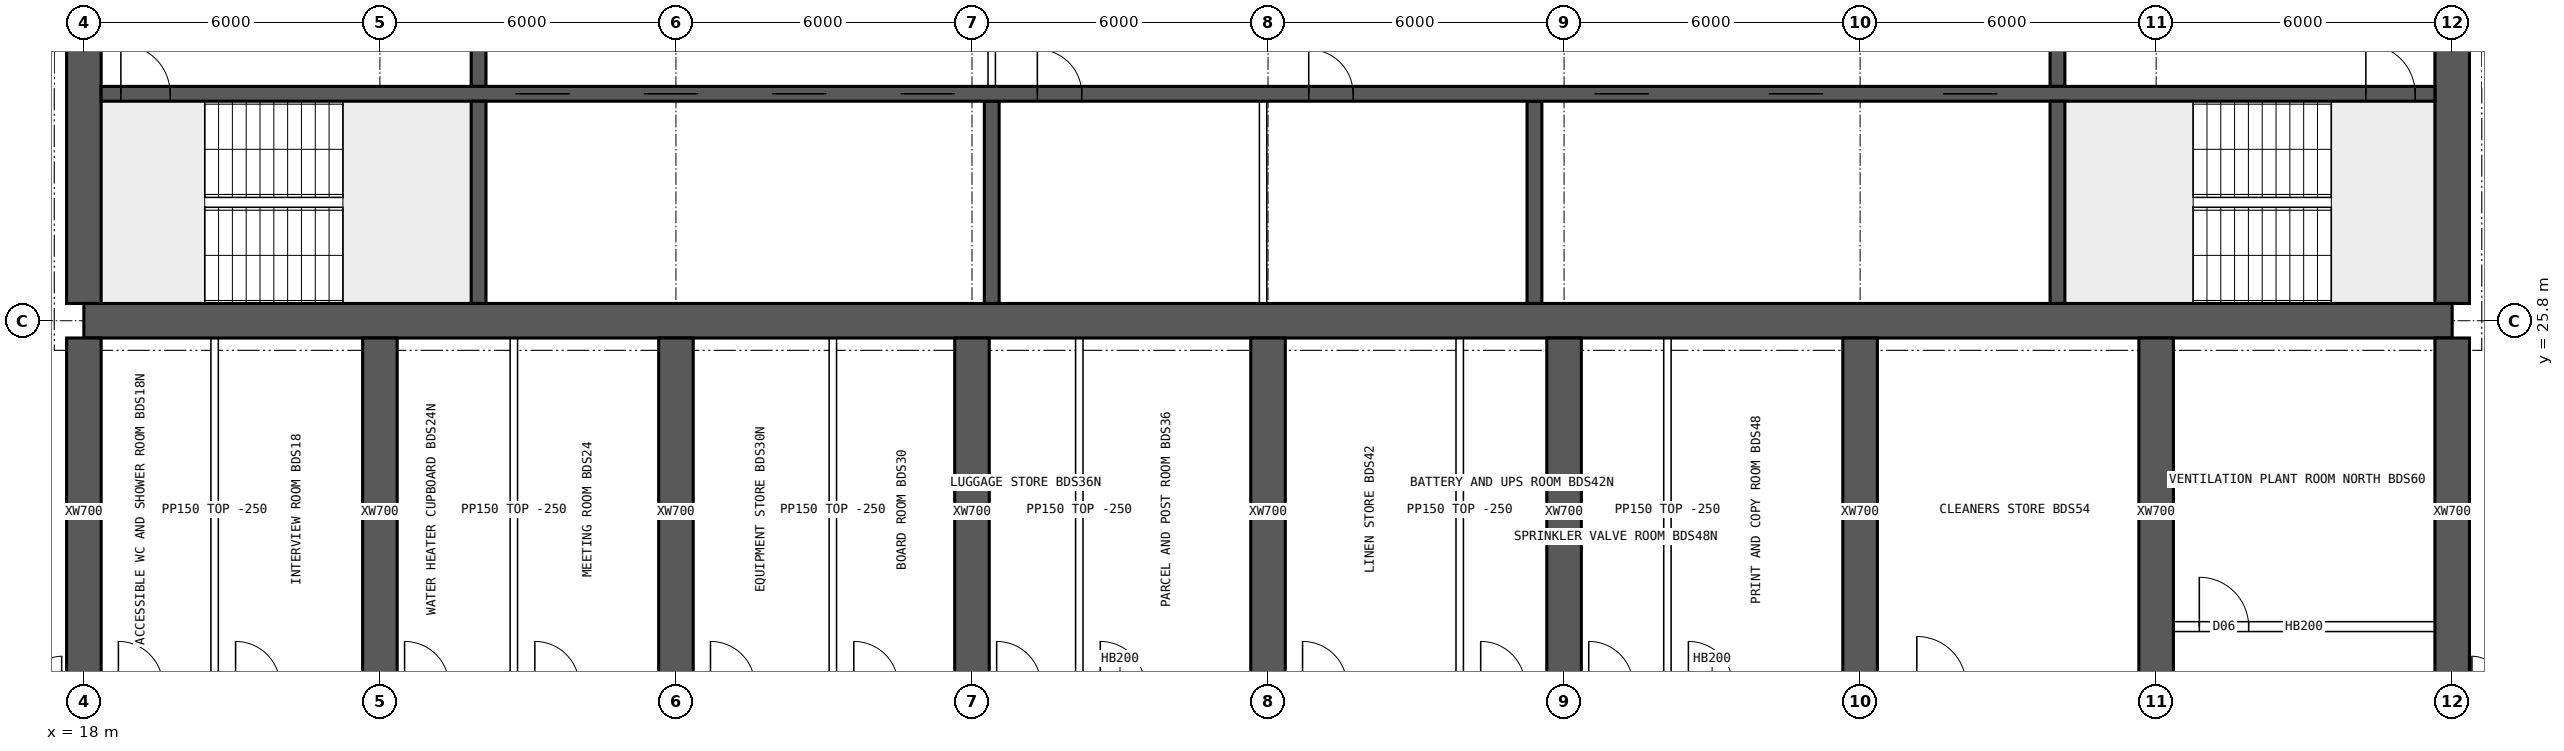
"""IFC4 building model, lengths in metres.
Left out: names, types, materials, properties, quantities, classifications, styles, units other than length and angle.
Written with IfcOpenShell. Run it as: python <this file> out.ifc"""

import sys

from ifc_helpers import new_model, si_unit, direction, frame, frame_2d, origin, place, context, subcontext, project, spatial, rectangle, extrude, element, fill, save


model = new_model("IFC4")
c1 = context("Model", 3, precision=1e-05, world=origin(), true_north=direction((0.0, 1.0)))
c2 = subcontext(c1, "Body", "Model", "MODEL_VIEW")
j1 = project(units=[si_unit("LENGTHUNIT", "METRE"), si_unit("PLANEANGLEUNIT", "RADIAN")], contexts=[c1])
p1 = place(None, origin())
s1 = spatial("IfcSite", under=j1, at=p1, CompositionType="ELEMENT")
p2 = place(p1, origin())
s2 = spatial("IfcBuilding", under=s1, at=p2, CompositionType="ELEMENT")
p3 = place(p2, frame((0.0, 0.0, 235.3)))
s3 = spatial("IfcBuildingStorey", under=s2, at=p3, CompositionType="ELEMENT", Elevation=235.3)
p4 = place(p3, frame((18.0, 25.8, 0.0), z_axis=(0.0, 0.0, 1.0), x_axis=(1.0, 0.0, 0.0)))
e1 = element("IfcWall", 1, at=p4, inside=s3, PredefinedType="SHEAR", context=c2, shape_type="SweptSolid", body=[
    extrude(rectangle(XDim=48.0, YDim=0.7, at=frame_2d((24.0, 0.0))), origin(), (0.0, 0.0, 1.0), 3.75),
])
p5 = place(p3, frame((18.0, 26.15, 0.0), z_axis=(0.0, 0.0, 1.0), x_axis=(0.0, 1.0, 0.0)))
e2 = element("IfcWall", 2, at=p5, inside=s3, PredefinedType="SHEAR", context=c2, shape_type="SweptSolid", body=[
    extrude(rectangle(XDim=11.7, YDim=0.7, at=frame_2d((5.85, 0.0))), origin(), (0.0, 0.0, 1.0), 3.75),
])
p6 = place(p5, frame((5.15, 0.0, 0.0)))
e3 = element("IfcOpeningElement", 3, at=p6, cuts=e2, PredefinedType="OPENING", context=c2, shape_type="SweptSolid", body=[
    extrude(rectangle(XDim=1.2, YDim=2.1, at=frame_2d((0.6, 1.05))), frame((0.0, 0.36, 0.0), z_axis=(0.0, -1.0, 0.0), x_axis=(1.0, 0.0, 0.0)), (0.0, 0.0, 1.0), 0.72),
])
p7 = place(p3, frame((66.0, 26.15, 0.0), z_axis=(0.0, 0.0, 1.0), x_axis=(0.0, 1.0, 0.0)))
e4 = element("IfcWall", 4, at=p7, inside=s3, PredefinedType="SHEAR", context=c2, shape_type="SweptSolid", body=[
    extrude(rectangle(XDim=11.7, YDim=0.7, at=frame_2d((5.85, 0.0))), origin(), (0.0, 0.0, 1.0), 3.75),
])
p8 = place(p7, frame((5.15, 0.0, 0.0)))
e5 = element("IfcOpeningElement", 5, at=p8, cuts=e4, PredefinedType="OPENING", context=c2, shape_type="SweptSolid", body=[
    extrude(rectangle(XDim=1.2, YDim=2.1, at=frame_2d((0.6, 1.05))), frame((0.0, 0.36, 0.0), z_axis=(0.0, -1.0, 0.0), x_axis=(1.0, 0.0, 0.0)), (0.0, 0.0, 1.0), 0.72),
])
p9 = place(p3, frame((18.35, 30.4, 0.0), z_axis=(0.0, 0.0, 1.0), x_axis=(1.0, 0.0, 0.0)))
e6 = element("IfcWall", 6, at=p9, inside=s3, PredefinedType="SHEAR", context=c2, shape_type="SweptSolid", body=[
    extrude(rectangle(XDim=47.3, YDim=0.3, at=frame_2d((23.65, 0.0))), origin(), (0.0, 0.0, 1.0), 3.75),
])
p10 = place(p9, frame((0.4, 0.0, 0.0)))
e7 = element("IfcOpeningElement", 7, at=p10, cuts=e6, PredefinedType="OPENING", context=c2, shape_type="SweptSolid", body=[
    extrude(rectangle(XDim=1.0, YDim=2.1, at=frame_2d((0.5, 1.05))), frame((0.0, 0.16, 0.0), z_axis=(0.0, -1.0, 0.0), x_axis=(1.0, 0.0, 0.0)), (0.0, 0.0, 1.0), 0.32),
])
p11 = place(p9, frame((45.9, 0.0, 0.0)))
e8 = element("IfcOpeningElement", 8, at=p11, cuts=e6, PredefinedType="OPENING", context=c2, shape_type="SweptSolid", body=[
    extrude(rectangle(XDim=1.0, YDim=2.1, at=frame_2d((0.5, 1.05))), frame((0.0, 0.16, 0.0), z_axis=(0.0, -1.0, 0.0), x_axis=(1.0, 0.0, 0.0)), (0.0, 0.0, 1.0), 0.32),
])
p12 = place(p9, frame((8.4, 0.0, 0.0)))
e9 = element("IfcOpeningElement", 9, at=p12, cuts=e6, PredefinedType="OPENING", context=c2, shape_type="SweptSolid", body=[
    extrude(rectangle(XDim=1.1, YDim=2.1, at=frame_2d((0.55, 1.05))), frame((0.0, 0.16, 0.0), z_axis=(0.0, -1.0, 0.0), x_axis=(1.0, 0.0, 0.0)), (0.0, 0.0, 1.0), 0.32),
])
p13 = place(p9, frame((11.0, 0.0, 0.0)))
e10 = element("IfcOpeningElement", 10, at=p13, cuts=e6, PredefinedType="OPENING", context=c2, shape_type="SweptSolid", body=[
    extrude(rectangle(XDim=1.1, YDim=2.1, at=frame_2d((0.55, 1.05))), frame((0.0, 0.16, 0.0), z_axis=(0.0, -1.0, 0.0), x_axis=(1.0, 0.0, 0.0)), (0.0, 0.0, 1.0), 0.32),
])
p14 = place(p9, frame((13.6, 0.0, 0.0)))
e11 = element("IfcOpeningElement", 11, at=p14, cuts=e6, PredefinedType="OPENING", context=c2, shape_type="SweptSolid", body=[
    extrude(rectangle(XDim=1.1, YDim=2.1, at=frame_2d((0.55, 1.05))), frame((0.0, 0.16, 0.0), z_axis=(0.0, -1.0, 0.0), x_axis=(1.0, 0.0, 0.0)), (0.0, 0.0, 1.0), 0.32),
])
p15 = place(p9, frame((16.2, 0.0, 0.0)))
e12 = element("IfcOpeningElement", 12, at=p15, cuts=e6, PredefinedType="OPENING", context=c2, shape_type="SweptSolid", body=[
    extrude(rectangle(XDim=1.1, YDim=2.1, at=frame_2d((0.55, 1.05))), frame((0.0, 0.16, 0.0), z_axis=(0.0, -1.0, 0.0), x_axis=(1.0, 0.0, 0.0)), (0.0, 0.0, 1.0), 0.32),
])
p16 = place(p9, frame((18.975, 0.0, 0.0)))
e13 = element("IfcOpeningElement", 13, at=p16, cuts=e6, PredefinedType="OPENING", context=c2, shape_type="SweptSolid", body=[
    extrude(rectangle(XDim=0.9, YDim=2.1, at=frame_2d((0.45, 1.05))), frame((0.0, 0.16, 0.0), z_axis=(0.0, -1.0, 0.0), x_axis=(1.0, 0.0, 0.0)), (0.0, 0.0, 1.0), 0.32),
])
p17 = place(p9, frame((24.475, 0.0, 0.0)))
e14 = element("IfcOpeningElement", 14, at=p17, cuts=e6, PredefinedType="OPENING", context=c2, shape_type="SweptSolid", body=[
    extrude(rectangle(XDim=0.9, YDim=2.1, at=frame_2d((0.45, 1.05))), frame((0.0, 0.16, 0.0), z_axis=(0.0, -1.0, 0.0), x_axis=(1.0, 0.0, 0.0)), (0.0, 0.0, 1.0), 0.32),
])
p18 = place(p9, frame((30.267, 0.0, 0.0)))
e15 = element("IfcOpeningElement", 15, at=p18, cuts=e6, PredefinedType="OPENING", context=c2, shape_type="SweptSolid", body=[
    extrude(rectangle(XDim=1.1, YDim=2.1, at=frame_2d((0.55, 1.05))), frame((0.0, 0.16, 0.0), z_axis=(0.0, -1.0, 0.0), x_axis=(1.0, 0.0, 0.0)), (0.0, 0.0, 1.0), 0.32),
])
p19 = place(p9, frame((33.8, 0.0, 0.0)))
e16 = element("IfcOpeningElement", 16, at=p19, cuts=e6, PredefinedType="OPENING", context=c2, shape_type="SweptSolid", body=[
    extrude(rectangle(XDim=1.1, YDim=2.1, at=frame_2d((0.55, 1.05))), frame((0.0, 0.16, 0.0), z_axis=(0.0, -1.0, 0.0), x_axis=(1.0, 0.0, 0.0)), (0.0, 0.0, 1.0), 0.32),
])
p20 = place(p9, frame((37.333, 0.0, 0.0)))
e17 = element("IfcOpeningElement", 17, at=p20, cuts=e6, PredefinedType="OPENING", context=c2, shape_type="SweptSolid", body=[
    extrude(rectangle(XDim=1.1, YDim=2.1, at=frame_2d((0.55, 1.05))), frame((0.0, 0.16, 0.0), z_axis=(0.0, -1.0, 0.0), x_axis=(1.0, 0.0, 0.0)), (0.0, 0.0, 1.0), 0.32),
])
for number, where, z_axis, x_axis in (
    (18, (26.0, 26.15, 0.0), (0.0, 0.0, 1.0), (0.0, 1.0, 0.0)),
    (19, (58.0, 26.15, 0.0), (0.0, 0.0, 1.0), (0.0, 1.0, 0.0)),
):
    element("IfcWall", number, at=place(p3, frame(where, z_axis=z_axis, x_axis=x_axis)), inside=s3, PredefinedType="SHEAR", context=c2, shape_type="SweptSolid", body=[
        extrude(rectangle(XDim=4.1, YDim=0.3, at=frame_2d((2.05, 0.0))), origin(), (0.0, 0.0, 1.0), 3.75),
    ])
p21 = place(p3, frame((26.0, 30.55, 0.0), z_axis=(0.0, 0.0, 1.0), x_axis=(0.0, 1.0, 0.0)))
e20 = element("IfcWall", 20, at=p21, inside=s3, PredefinedType="SHEAR", context=c2, shape_type="SweptSolid", body=[
    extrude(rectangle(XDim=3.9, YDim=0.3, at=frame_2d((1.95, 0.0))), origin(), (0.0, 0.0, 1.0), 3.75),
])
p22 = place(p21, frame((1.4, 0.0, 0.0)))
e21 = element("IfcOpeningElement", 21, at=p22, cuts=e20, PredefinedType="OPENING", context=c2, shape_type="SweptSolid", body=[
    extrude(rectangle(XDim=1.2, YDim=2.1, at=frame_2d((0.6, 1.05))), frame((0.0, 0.16, 0.0), z_axis=(0.0, -1.0, 0.0), x_axis=(1.0, 0.0, 0.0)), (0.0, 0.0, 1.0), 0.32),
])
p23 = place(p3, frame((58.0, 30.55, 0.0), z_axis=(0.0, 0.0, 1.0), x_axis=(0.0, 1.0, 0.0)))
e22 = element("IfcWall", 22, at=p23, inside=s3, PredefinedType="SHEAR", context=c2, shape_type="SweptSolid", body=[
    extrude(rectangle(XDim=3.9, YDim=0.3, at=frame_2d((1.95, 0.0))), origin(), (0.0, 0.0, 1.0), 3.75),
])
p24 = place(p23, frame((1.4, 0.0, 0.0)))
e23 = element("IfcOpeningElement", 23, at=p24, cuts=e22, PredefinedType="OPENING", context=c2, shape_type="SweptSolid", body=[
    extrude(rectangle(XDim=1.2, YDim=2.1, at=frame_2d((0.6, 1.05))), frame((0.0, 0.16, 0.0), z_axis=(0.0, -1.0, 0.0), x_axis=(1.0, 0.0, 0.0)), (0.0, 0.0, 1.0), 0.32),
])
for number, where, z_axis, x_axis in (
    (24, (36.4, 26.15, 0.0), (0.0, 0.0, 1.0), (0.0, 1.0, 0.0)),
    (25, (47.4, 26.15, 0.0), (0.0, 0.0, 1.0), (0.0, 1.0, 0.0)),
):
    element("IfcWall", number, at=place(p3, frame(where, z_axis=z_axis, x_axis=x_axis)), inside=s3, PredefinedType="SHEAR", context=c2, shape_type="SweptSolid", body=[
        extrude(rectangle(XDim=4.1, YDim=0.3, at=frame_2d((2.05, 0.0))), origin(), (0.0, 0.0, 1.0), 3.75),
    ])
for number, where, z_axis, x_axis in (
    (26, (18.0, 18.4, 0.0), (0.0, 0.0, 1.0), (0.0, 1.0, 0.0)),
    (27, (24.0, 18.4, 0.0), (0.0, 0.0, 1.0), (0.0, 1.0, 0.0)),
    (28, (30.0, 18.4, 0.0), (0.0, 0.0, 1.0), (0.0, 1.0, 0.0)),
    (29, (36.0, 18.4, 0.0), (0.0, 0.0, 1.0), (0.0, 1.0, 0.0)),
    (30, (42.0, 18.4, 0.0), (0.0, 0.0, 1.0), (0.0, 1.0, 0.0)),
    (31, (48.0, 18.4, 0.0), (0.0, 0.0, 1.0), (0.0, 1.0, 0.0)),
    (32, (54.0, 18.4, 0.0), (0.0, 0.0, 1.0), (0.0, 1.0, 0.0)),
    (33, (60.0, 18.4, 0.0), (0.0, 0.0, 1.0), (0.0, 1.0, 0.0)),
    (34, (66.0, 18.4, 0.0), (0.0, 0.0, 1.0), (0.0, 1.0, 0.0)),
):
    element("IfcWall", number, at=place(p3, frame(where, z_axis=z_axis, x_axis=x_axis)), inside=s3, PredefinedType="SHEAR", context=c2, shape_type="SweptSolid", body=[
        extrude(rectangle(XDim=7.05, YDim=0.7, at=frame_2d((3.525, 0.0))), origin(), (0.0, 0.0, 1.0), 3.75),
    ])
p25 = place(p3, frame((36.4, 30.55, 0.0), z_axis=(0.0, 0.0, 1.0), x_axis=(0.0, 1.0, 0.0)))
e35 = element("IfcWall", 35, at=p25, inside=s3, PredefinedType="SOLIDWALL", context=c2, shape_type="SweptSolid", body=[
    extrude(rectangle(XDim=3.9, YDim=0.15, at=frame_2d((1.95, 0.0))), origin(), (0.0, 0.0, 1.0), 3.5),
])
p26 = place(p25, frame((1.15, 0.0, 0.0)))
e36 = element("IfcOpeningElement", 36, at=p26, cuts=e35, PredefinedType="OPENING", context=c2, shape_type="SweptSolid", body=[
    extrude(rectangle(XDim=1.6, YDim=2.1, at=frame_2d((0.8, 1.05))), frame((0.0, 0.085, 0.0), z_axis=(0.0, -1.0, 0.0), x_axis=(1.0, 0.0, 0.0)), (0.0, 0.0, 1.0), 0.17),
])
p27 = place(p3, frame((41.9, 26.15, 0.0), z_axis=(0.0, 0.0, 1.0), x_axis=(0.0, 1.0, 0.0)))
e37 = element("IfcWall", 37, at=p27, inside=s3, PredefinedType="SOLIDWALL", context=c2, shape_type="SweptSolid", body=[
    extrude(rectangle(XDim=4.1, YDim=0.15, at=frame_2d((2.05, 0.0))), origin(), (0.0, 0.0, 1.0), 3.5),
])
for number, where, z_axis, x_axis in (
    (38, (20.65, 18.5, 0.0), (0.0, 0.0, 1.0), (0.0, 1.0, 0.0)),
    (39, (26.715, 18.5, 0.0), (0.0, 0.0, 1.0), (0.0, 1.0, 0.0)),
    (40, (33.18, 18.5, 0.0), (0.0, 0.0, 1.0), (0.0, 1.0, 0.0)),
    (41, (38.175, 18.5, 0.0), (0.0, 0.0, 1.0), (0.0, 1.0, 0.0)),
    (42, (45.885, 18.5, 0.0), (0.0, 0.0, 1.0), (0.0, 1.0, 0.0)),
    (43, (50.095, 18.5, 0.0), (0.0, 0.0, 1.0), (0.0, 1.0, 0.0)),
):
    element("IfcWall", number, at=place(p3, frame(where, z_axis=z_axis, x_axis=x_axis)), inside=s3, PredefinedType="PARTITIONING", context=c2, shape_type="SweptSolid", body=[
        extrude(rectangle(XDim=6.95, YDim=0.15, at=frame_2d((3.475, 0.0))), origin(), (0.0, 0.0, 1.0), 3.5),
    ])
p28 = place(p3, frame((60.35, 19.6, 0.0), z_axis=(0.0, 0.0, 1.0), x_axis=(1.0, 0.0, 0.0)))
e44 = element("IfcWall", 44, at=p28, inside=s3, PredefinedType="SOLIDWALL", context=c2, shape_type="SweptSolid", body=[
    extrude(rectangle(XDim=5.3, YDim=0.2, at=frame_2d((2.65, 0.0))), origin(), (0.0, 0.0, 1.0), 3.5),
])
p29 = place(p28, frame((0.525, 0.0, 0.0)))
e45 = element("IfcOpeningElement", 45, at=p29, cuts=e44, PredefinedType="OPENING", context=c2, shape_type="SweptSolid", body=[
    extrude(rectangle(XDim=1.0, YDim=2.1, at=frame_2d((0.5, 1.05))), frame((0.0, 0.11, 0.0), z_axis=(0.0, -1.0, 0.0), x_axis=(1.0, 0.0, 0.0)), (0.0, 0.0, 1.0), 0.22),
])
p30 = place(p10, origin())
e46 = element("IfcDoor", 46, at=p30, inside=s3, OperationType="SINGLE_SWING_LEFT", PredefinedType="DOOR", context=c2, shape_type="SweptSolid", body=[
    extrude(rectangle(XDim=1.0, YDim=2.1, at=frame_2d((0.5, 1.05))), frame((0.0, 0.025, 0.0), z_axis=(0.0, -1.0, 0.0), x_axis=(1.0, 0.0, 0.0)), (0.0, 0.0, 1.0), 0.05),
])
fill(e7, e46)
p31 = place(p11, origin())
e47 = element("IfcDoor", 47, at=p31, inside=s3, OperationType="SINGLE_SWING_LEFT", PredefinedType="DOOR", context=c2, shape_type="SweptSolid", body=[
    extrude(rectangle(XDim=1.0, YDim=2.1, at=frame_2d((0.5, 1.05))), frame((0.0, 0.025, 0.0), z_axis=(0.0, -1.0, 0.0), x_axis=(1.0, 0.0, 0.0)), (0.0, 0.0, 1.0), 0.05),
])
fill(e8, e47)
p32 = place(p12, origin())
e48 = element("IfcDoor", 48, at=p32, inside=s3, OperationType="DOUBLE_DOOR_SLIDING", PredefinedType="DOOR", context=c2, shape_type="SweptSolid", body=[
    extrude(rectangle(XDim=1.1, YDim=2.1, at=frame_2d((0.55, 1.05))), frame((0.0, 0.025, 0.0), z_axis=(0.0, -1.0, 0.0), x_axis=(1.0, 0.0, 0.0)), (0.0, 0.0, 1.0), 0.05),
])
fill(e9, e48)
p33 = place(p13, origin())
e49 = element("IfcDoor", 49, at=p33, inside=s3, OperationType="DOUBLE_DOOR_SLIDING", PredefinedType="DOOR", context=c2, shape_type="SweptSolid", body=[
    extrude(rectangle(XDim=1.1, YDim=2.1, at=frame_2d((0.55, 1.05))), frame((0.0, 0.025, 0.0), z_axis=(0.0, -1.0, 0.0), x_axis=(1.0, 0.0, 0.0)), (0.0, 0.0, 1.0), 0.05),
])
fill(e10, e49)
p34 = place(p14, origin())
e50 = element("IfcDoor", 50, at=p34, inside=s3, OperationType="DOUBLE_DOOR_SLIDING", PredefinedType="DOOR", context=c2, shape_type="SweptSolid", body=[
    extrude(rectangle(XDim=1.1, YDim=2.1, at=frame_2d((0.55, 1.05))), frame((0.0, 0.025, 0.0), z_axis=(0.0, -1.0, 0.0), x_axis=(1.0, 0.0, 0.0)), (0.0, 0.0, 1.0), 0.05),
])
fill(e11, e50)
p35 = place(p15, origin())
e51 = element("IfcDoor", 51, at=p35, inside=s3, OperationType="DOUBLE_DOOR_SLIDING", PredefinedType="DOOR", context=c2, shape_type="SweptSolid", body=[
    extrude(rectangle(XDim=1.1, YDim=2.1, at=frame_2d((0.55, 1.05))), frame((0.0, 0.025, 0.0), z_axis=(0.0, -1.0, 0.0), x_axis=(1.0, 0.0, 0.0)), (0.0, 0.0, 1.0), 0.05),
])
fill(e12, e51)
p36 = place(p16, origin())
e52 = element("IfcDoor", 52, at=p36, inside=s3, OperationType="SINGLE_SWING_LEFT", PredefinedType="DOOR", context=c2, shape_type="SweptSolid", body=[
    extrude(rectangle(XDim=0.9, YDim=2.1, at=frame_2d((0.45, 1.05))), frame((0.0, 0.025, 0.0), z_axis=(0.0, -1.0, 0.0), x_axis=(1.0, 0.0, 0.0)), (0.0, 0.0, 1.0), 0.05),
])
fill(e13, e52)
p37 = place(p17, origin())
e53 = element("IfcDoor", 53, at=p37, inside=s3, OperationType="SINGLE_SWING_LEFT", PredefinedType="DOOR", context=c2, shape_type="SweptSolid", body=[
    extrude(rectangle(XDim=0.9, YDim=2.1, at=frame_2d((0.45, 1.05))), frame((0.0, 0.025, 0.0), z_axis=(0.0, -1.0, 0.0), x_axis=(1.0, 0.0, 0.0)), (0.0, 0.0, 1.0), 0.05),
])
fill(e14, e53)
p38 = place(p18, origin())
e54 = element("IfcDoor", 54, at=p38, inside=s3, OperationType="DOUBLE_DOOR_SLIDING", PredefinedType="DOOR", context=c2, shape_type="SweptSolid", body=[
    extrude(rectangle(XDim=1.1, YDim=2.1, at=frame_2d((0.55, 1.05))), frame((0.0, 0.025, 0.0), z_axis=(0.0, -1.0, 0.0), x_axis=(1.0, 0.0, 0.0)), (0.0, 0.0, 1.0), 0.05),
])
fill(e15, e54)
p39 = place(p19, origin())
e55 = element("IfcDoor", 55, at=p39, inside=s3, OperationType="DOUBLE_DOOR_SLIDING", PredefinedType="DOOR", context=c2, shape_type="SweptSolid", body=[
    extrude(rectangle(XDim=1.1, YDim=2.1, at=frame_2d((0.55, 1.05))), frame((0.0, 0.025, 0.0), z_axis=(0.0, -1.0, 0.0), x_axis=(1.0, 0.0, 0.0)), (0.0, 0.0, 1.0), 0.05),
])
fill(e16, e55)
p40 = place(p20, origin())
e56 = element("IfcDoor", 56, at=p40, inside=s3, OperationType="DOUBLE_DOOR_SLIDING", PredefinedType="DOOR", context=c2, shape_type="SweptSolid", body=[
    extrude(rectangle(XDim=1.1, YDim=2.1, at=frame_2d((0.55, 1.05))), frame((0.0, 0.025, 0.0), z_axis=(0.0, -1.0, 0.0), x_axis=(1.0, 0.0, 0.0)), (0.0, 0.0, 1.0), 0.05),
])
fill(e17, e56)
p41 = place(p29, origin())
e57 = element("IfcDoor", 57, at=p41, inside=s3, OperationType="SINGLE_SWING_LEFT", PredefinedType="DOOR", context=c2, shape_type="SweptSolid", body=[
    extrude(rectangle(XDim=1.0, YDim=2.1, at=frame_2d((0.5, 1.05))), frame((0.0, 0.025, 0.0), z_axis=(0.0, -1.0, 0.0), x_axis=(1.0, 0.0, 0.0)), (0.0, 0.0, 1.0), 0.05),
])
fill(e45, e57)
save(model, sys.argv[1])
